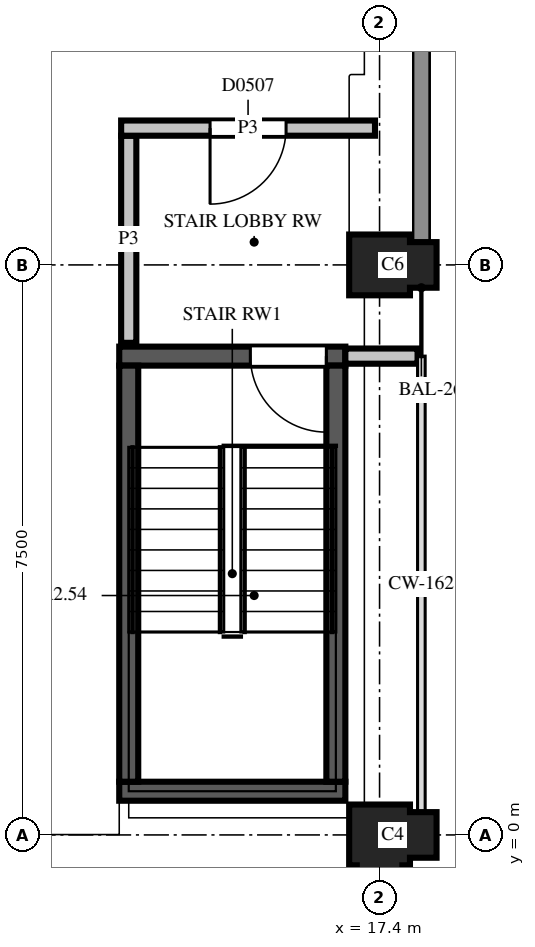
"""IFC4 building model, lengths in metres.
Left out: names, types, materials, properties, quantities, classifications, styles, units other than length and angle.
Written with IfcOpenShell. Run it as: python <this file> out.ifc"""

import sys

from ifc_helpers import new_model, si_unit, direction, frame, frame_2d, origin, place, context, subcontext, project, spatial, polyline, rectangle, outline, extrude, element, fill, save


model = new_model("IFC4")
c1 = context("Model", 3, precision=1e-05, world=origin(), true_north=direction((0.0, 1.0)))
c2 = subcontext(c1, "Body", "Model", "MODEL_VIEW")
j1 = project(units=[si_unit("LENGTHUNIT", "METRE"), si_unit("PLANEANGLEUNIT", "RADIAN")], contexts=[c1])
p1 = place(None, origin())
s1 = spatial("IfcSite", under=j1, at=p1, CompositionType="ELEMENT")
p2 = place(p1, origin())
s2 = spatial("IfcBuilding", under=s1, at=p2, CompositionType="ELEMENT")
p3 = place(p2, frame((0.0, 0.0, 19.3)))
s3 = spatial("IfcBuildingStorey", under=s2, at=p3, CompositionType="ELEMENT", Elevation=19.3)
p4 = place(p3, frame((17.4, 0.0, 0.0), z_axis=(0.0, 0.0, 1.0), x_axis=(0.0, -1.0, 0.0)))
e1 = element("IfcColumn", 1, at=p4, inside=s3, PredefinedType="COLUMN", context=c2, shape_type="SweptSolid", body=[
    extrude(outline(polyline([(-0.4, -0.4), (0.4, -0.4), (0.4, -0.3), (0.75, -0.3), (0.75, 0.3), (0.4, 0.3), (0.4, 0.4), (0.3, 0.4), (0.3, 0.75), (-0.3, 0.75), (-0.3, 0.4), (-0.4, 0.4), (-0.4, -0.4)])), origin(), (0.0, 0.0, 1.0), 3.7),
])
p5 = place(p3, frame((17.4, 7.5, 0.0), z_axis=(0.0, 0.0, 1.0), x_axis=(1.0, 0.0, 0.0)))
e2 = element("IfcColumn", 2, at=p5, inside=s3, PredefinedType="COLUMN", context=c2, shape_type="SweptSolid", body=[
    extrude(outline(polyline([(-0.4, -0.4), (0.4, -0.4), (0.4, -0.3), (0.75, -0.3), (0.75, 0.3), (0.4, 0.3), (0.4, 0.4), (-0.4, 0.4), (-0.4, -0.4)])), origin(), (0.0, 0.0, 1.0), 3.7),
])
p6 = place(p3, frame((13.975, 0.575, 0.0), z_axis=(0.0, 0.0, 1.0), x_axis=(1.0, 0.0, 0.0)))
e3 = element("IfcWall", 3, at=p6, inside=s3, PredefinedType="SHEAR", context=c2, shape_type="SweptSolid", body=[
    extrude(rectangle(XDim=2.975, YDim=0.25, at=frame_2d((1.487, 0.0))), origin(), (0.0, 0.0, 1.0), 3.7),
])
p7 = place(p3, frame((13.975, 6.3, 0.0), z_axis=(0.0, 0.0, 1.0), x_axis=(1.0, 0.0, 0.0)))
e4 = element("IfcWall", 4, at=p7, inside=s3, PredefinedType="SHEAR", context=c2, shape_type="SweptSolid", body=[
    extrude(rectangle(XDim=2.975, YDim=0.25, at=frame_2d((1.487, 0.0))), origin(), (0.0, 0.0, 1.0), 3.7),
])
p8 = place(p7, frame((1.725, 0.0, 0.0)))
e5 = element("IfcOpeningElement", 5, at=p8, cuts=e4, PredefinedType="OPENING", context=c2, shape_type="SweptSolid", body=[
    extrude(rectangle(XDim=1.0, YDim=2.1, at=frame_2d((0.5, 1.05))), frame((0.0, 0.135, 0.0), z_axis=(0.0, -1.0, 0.0), x_axis=(1.0, 0.0, 0.0)), (0.0, 0.0, 1.0), 0.27),
])
for number, where, z_axis, x_axis in (
    (6, (14.1, 0.7, 0.0), (0.0, 0.0, 1.0), (0.0, 1.0, 0.0)),
    (7, (16.825, 0.7, 0.0), (0.0, 0.0, 1.0), (0.0, 1.0, 0.0)),
):
    element("IfcWall", number, at=place(p3, frame(where, z_axis=z_axis, x_axis=x_axis)), inside=s3, PredefinedType="SHEAR", context=c2, shape_type="SweptSolid", body=[
        extrude(rectangle(XDim=5.475, YDim=0.25, at=frame_2d((2.738, 0.0))), origin(), (0.0, 0.0, 1.0), 3.7),
    ])
p9 = place(p3, frame((16.95, 6.3, 0.0), z_axis=(0.0, 0.0, 1.0), x_axis=(1.0, 0.0, 0.0)))
e8 = element("IfcWall", 8, at=p9, inside=s3, PredefinedType="PARTITIONING", context=c2, shape_type="SweptSolid", body=[
    extrude(rectangle(XDim=0.95, YDim=0.2, at=frame_2d((0.475, 0.0))), origin(), (0.0, 0.0, 1.0), 2.88),
])
p10 = place(p3, frame((14.1, 9.2, 0.0), z_axis=(0.0, 0.0, 1.0), x_axis=(0.0, -1.0, 0.0)))
e9 = element("IfcWall", 9, at=p10, inside=s3, PredefinedType="PARTITIONING", context=c2, shape_type="SweptSolid", body=[
    extrude(rectangle(XDim=2.725, YDim=0.2, at=frame_2d((1.362, 0.0))), origin(), (0.0, 0.0, 1.0), 2.88),
])
p11 = place(p3, frame((17.34, 9.3, 0.0), z_axis=(0.0, 0.0, 1.0), x_axis=(-1.0, 0.0, 0.0)))
e10 = element("IfcWall", 10, at=p11, inside=s3, PredefinedType="PARTITIONING", context=c2, shape_type="SweptSolid", body=[
    extrude(rectangle(XDim=3.34, YDim=0.2, at=frame_2d((1.67, 0.0))), origin(), (0.0, 0.0, 1.0), 2.88),
])
p12 = place(p11, frame((1.17, 0.0, 0.0)))
e11 = element("IfcOpeningElement", 11, at=p12, cuts=e10, PredefinedType="OPENING", context=c2, shape_type="SweptSolid", body=[
    extrude(rectangle(XDim=1.0, YDim=2.1, at=frame_2d((0.5, 1.05))), frame((0.0, 0.11, 0.0), z_axis=(0.0, -1.0, 0.0), x_axis=(1.0, 0.0, 0.0)), (0.0, 0.0, 1.0), 0.22),
])
p13 = place(p12, origin())
e12 = element("IfcDoor", 12, at=p13, inside=s3, OperationType="SINGLE_SWING_LEFT", PredefinedType="DOOR", context=c2, shape_type="SweptSolid", body=[
    extrude(rectangle(XDim=1.0, YDim=2.1, at=frame_2d((0.5, 1.05))), frame((0.0, 0.025, 0.0), z_axis=(0.0, -1.0, 0.0), x_axis=(1.0, 0.0, 0.0)), (0.0, 0.0, 1.0), 0.05),
])
fill(e11, e12)
p14 = place(p8, origin())
e13 = element("IfcDoor", 13, at=p14, inside=s3, OperationType="SINGLE_SWING_RIGHT", PredefinedType="DOOR", context=c2, shape_type="SweptSolid", body=[
    extrude(rectangle(XDim=1.0, YDim=2.1, at=frame_2d((0.5, 1.05))), frame((0.0, 0.025, 0.0), z_axis=(0.0, -1.0, 0.0), x_axis=(1.0, 0.0, 0.0)), (0.0, 0.0, 1.0), 0.05),
])
fill(e5, e13)
save(model, sys.argv[1])
